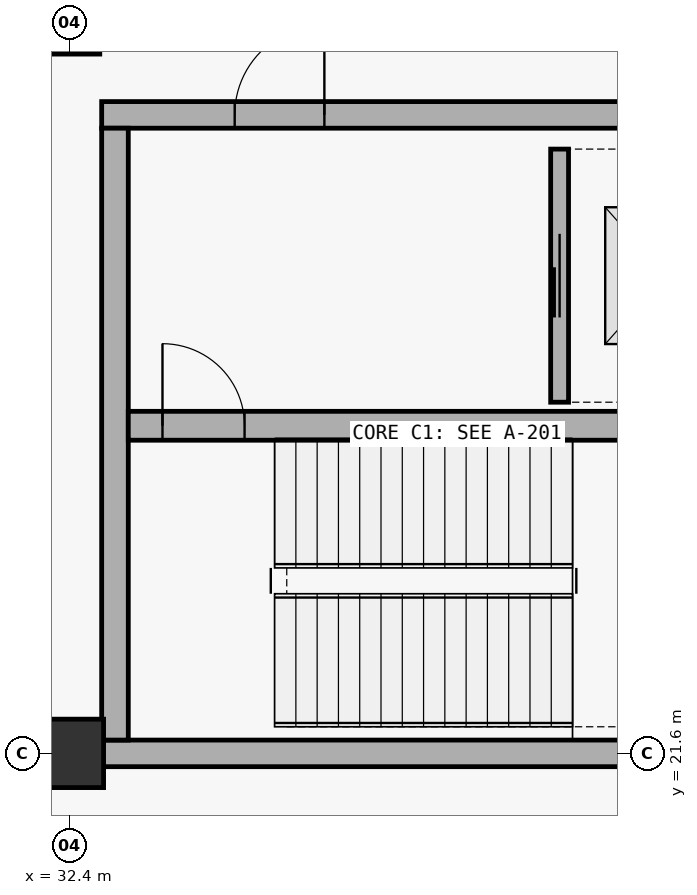
"""IFC4 building model, lengths in metres.
Left out: names, types, materials, properties, quantities, classifications, styles, units other than length and angle.
Written with IfcOpenShell. Run it as: python <this file> out.ifc"""

import sys

from ifc_helpers import new_model, si_unit, direction, frame, frame_2d, origin, origin_2d, place, context, subcontext, project, spatial, rectangle, extrude, element, fill, save


model = new_model("IFC4")
c1 = context("Model", 3, precision=1e-05, world=origin(), true_north=direction((0.0, 1.0)))
c2 = subcontext(c1, "Body", "Model", "MODEL_VIEW")
j1 = project(units=[si_unit("LENGTHUNIT", "METRE"), si_unit("PLANEANGLEUNIT", "RADIAN")], contexts=[c1])
p1 = place(None, origin())
s1 = spatial("IfcSite", under=j1, at=p1, CompositionType="ELEMENT")
p2 = place(p1, origin())
s2 = spatial("IfcBuilding", under=s1, at=p2, CompositionType="ELEMENT")
p3 = place(p2, frame((0.0, 0.0, 5.4)))
s3 = spatial("IfcBuildingStorey", under=s2, at=p3, CompositionType="ELEMENT", Elevation=5.4)
p4 = place(p3, frame((32.4, 21.6, 0.0), z_axis=(0.0, 0.0, 1.0), x_axis=(1.0, 0.0, 0.0)))
e1 = element("IfcColumn", 1, at=p4, inside=s3, PredefinedType="COLUMN", context=c2, shape_type="SweptSolid", body=[
    extrude(rectangle(XDim=0.9, YDim=0.9, at=origin_2d()), origin(), (0.0, 0.0, 1.0), 5.1),
])
p5 = place(p3, frame((32.4, 31.2, 0.0), z_axis=(0.0, 0.0, 1.0), x_axis=(1.0, 0.0, 0.0)))
e2 = element("IfcColumn", 2, at=p5, inside=s3, PredefinedType="COLUMN", context=c2, shape_type="SweptSolid", body=[
    extrude(rectangle(XDim=0.8, YDim=0.8, at=origin_2d()), origin(), (0.0, 0.0, 1.0), 5.1),
])
p6 = place(p3, frame((32.825, 21.6, 0.0), z_axis=(0.0, 0.0, 1.0), x_axis=(1.0, 0.0, 0.0)))
e3 = element("IfcWall", 3, at=p6, inside=s3, PredefinedType="SHEAR", context=c2, shape_type="SweptSolid", body=[
    extrude(rectangle(XDim=9.35, YDim=0.35, at=frame_2d((4.675, 0.0))), origin(), (0.0, 0.0, 1.0), 5.1),
])
p7 = place(p3, frame((32.825, 30.0, 0.0), z_axis=(0.0, 0.0, 1.0), x_axis=(1.0, 0.0, 0.0)))
e4 = element("IfcWall", 4, at=p7, inside=s3, PredefinedType="SHEAR", context=c2, shape_type="SweptSolid", body=[
    extrude(rectangle(XDim=9.35, YDim=0.35, at=frame_2d((4.675, 0.0))), origin(), (0.0, 0.0, 1.0), 5.1),
])
p8 = place(p7, frame((1.75, 0.0, 0.0)))
e5 = element("IfcOpeningElement", 5, at=p8, cuts=e4, PredefinedType="OPENING", context=c2, shape_type="SweptSolid", body=[
    extrude(rectangle(XDim=1.18, YDim=2.24, at=frame_2d((0.59, 1.12))), frame((0.0, 0.185, 0.0), z_axis=(0.0, -1.0, 0.0), x_axis=(1.0, 0.0, 0.0)), (0.0, 0.0, 1.0), 0.37),
])
p9 = place(p3, frame((33.0, 21.775, 0.0), z_axis=(0.0, 0.0, 1.0), x_axis=(0.0, 1.0, 0.0)))
e6 = element("IfcWall", 6, at=p9, inside=s3, PredefinedType="SHEAR", context=c2, shape_type="SweptSolid", body=[
    extrude(rectangle(XDim=8.05, YDim=0.35, at=frame_2d((4.025, 0.0))), origin(), (0.0, 0.0, 1.0), 5.1),
])
p10 = place(p3, frame((33.175, 25.91, 0.0), z_axis=(0.0, 0.0, 1.0), x_axis=(1.0, 0.0, 0.0)))
e7 = element("IfcWall", 7, at=p10, inside=s3, PredefinedType="SHEAR", context=c2, shape_type="SweptSolid", body=[
    extrude(rectangle(XDim=8.65, YDim=0.38, at=frame_2d((4.325, 0.0))), origin(), (0.0, 0.0, 1.0), 5.1),
])
p11 = place(p10, frame((0.45, 0.0, 0.0)))
e8 = element("IfcOpeningElement", 8, at=p11, cuts=e7, PredefinedType="OPENING", context=c2, shape_type="SweptSolid", body=[
    extrude(rectangle(XDim=1.08, YDim=2.18, at=frame_2d((0.54, 1.09))), frame((0.0, 0.2, 0.0), z_axis=(0.0, -1.0, 0.0), x_axis=(1.0, 0.0, 0.0)), (0.0, 0.0, 1.0), 0.4),
])
p12 = place(p3, frame((38.85, 26.22, 0.0), z_axis=(0.0, 0.0, 1.0), x_axis=(0.0, 1.0, 0.0)))
e9 = element("IfcWall", 9, at=p12, inside=s3, PredefinedType="PARTITIONING", context=c2, shape_type="SweptSolid", body=[
    extrude(rectangle(XDim=3.33, YDim=0.235, at=frame_2d((1.665, 0.0))), origin(), (0.0, 0.0, 1.0), 4.72),
])
p13 = place(p12, frame((1.115, 0.0, 0.0)))
e10 = element("IfcOpeningElement", 10, at=p13, cuts=e9, PredefinedType="OPENING", context=c2, shape_type="SweptSolid", body=[
    extrude(rectangle(XDim=1.1, YDim=2.2, at=frame_2d((0.55, 1.1))), frame((0.0, 0.127, 0.0), z_axis=(0.0, -1.0, 0.0), x_axis=(1.0, 0.0, 0.0)), (0.0, 0.0, 1.0), 0.255),
])
p14 = place(p11, origin())
e11 = element("IfcDoor", 11, at=p14, inside=s3, OperationType="SINGLE_SWING_LEFT", PredefinedType="DOOR", context=c2, shape_type="SweptSolid", body=[
    extrude(rectangle(XDim=1.08, YDim=2.18, at=frame_2d((0.54, 1.09))), frame((0.0, 0.025, 0.0), z_axis=(0.0, -1.0, 0.0), x_axis=(1.0, 0.0, 0.0)), (0.0, 0.0, 1.0), 0.05),
])
fill(e8, e11)
p15 = place(p8, origin())
e12 = element("IfcDoor", 12, at=p15, inside=s3, OperationType="SINGLE_SWING_RIGHT", PredefinedType="DOOR", context=c2, shape_type="SweptSolid", body=[
    extrude(rectangle(XDim=1.18, YDim=2.24, at=frame_2d((0.59, 1.12))), frame((0.0, 0.025, 0.0), z_axis=(0.0, -1.0, 0.0), x_axis=(1.0, 0.0, 0.0)), (0.0, 0.0, 1.0), 0.05),
])
fill(e5, e12)
p16 = place(p13, origin())
e13 = element("IfcDoor", 13, at=p16, inside=s3, OperationType="SLIDING_TO_LEFT", PredefinedType="DOOR", context=c2, shape_type="SweptSolid", body=[
    extrude(rectangle(XDim=1.1, YDim=2.2, at=frame_2d((0.55, 1.1))), frame((0.0, 0.025, 0.0), z_axis=(0.0, -1.0, 0.0), x_axis=(1.0, 0.0, 0.0)), (0.0, 0.0, 1.0), 0.05),
])
fill(e10, e13)
save(model, sys.argv[1])
